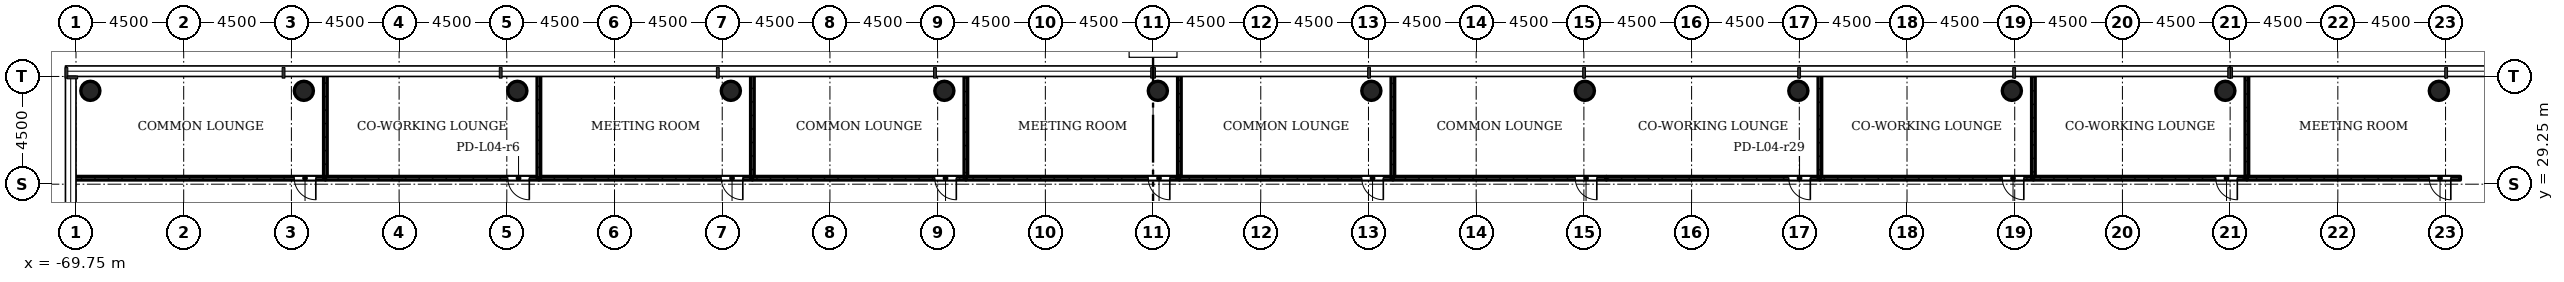
"""IFC4 building model, lengths in metres.
Left out: names, types, materials, properties, quantities, classifications, styles, units other than length and angle.
Written with IfcOpenShell. Run it as: python <this file> out.ifc"""

import sys

from ifc_helpers import new_model, si_unit, direction, frame, frame_2d, origin, origin_2d, place, context, subcontext, project, spatial, rectangle, hollow_circle, extrude, element, fill, save


model = new_model("IFC4")
c1 = context("Model", 3, precision=1e-05, world=origin(), true_north=direction((0.0, 1.0)))
c2 = subcontext(c1, "Body", "Model", "MODEL_VIEW")
j1 = project(units=[si_unit("LENGTHUNIT", "METRE"), si_unit("PLANEANGLEUNIT", "RADIAN")], contexts=[c1])
p1 = place(None, origin())
s1 = spatial("IfcSite", under=j1, at=p1, CompositionType="ELEMENT")
p2 = place(p1, origin())
s2 = spatial("IfcBuilding", under=s1, at=p2, CompositionType="ELEMENT")
p3 = place(p2, frame((0.0, 0.0, 20.0)))
s3 = spatial("IfcBuildingStorey", under=s2, at=p3, CompositionType="ELEMENT", Elevation=20.0)
for number, where, z_axis, x_axis in (
    (1, (-69.15, 33.15, 0.0), (0.0, 0.0, 1.0), (1.0, 0.0, 0.0)),
    (2, (-60.23, 33.15, 0.0), (0.0, 0.0, 1.0), (1.0, 0.0, 0.0)),
    (3, (-51.31, 33.15, 0.0), (0.0, 0.0, 1.0), (1.0, 0.0, 0.0)),
    (4, (-42.39, 33.15, 0.0), (0.0, 0.0, 1.0), (1.0, 0.0, 0.0)),
    (5, (-33.47, 33.15, 0.0), (0.0, 0.0, 1.0), (1.0, 0.0, 0.0)),
    (6, (-24.55, 33.15, 0.0), (0.0, 0.0, 1.0), (1.0, 0.0, 0.0)),
    (7, (-15.63, 33.15, 0.0), (0.0, 0.0, 1.0), (1.0, 0.0, 0.0)),
    (8, (-6.71, 33.15, 0.0), (0.0, 0.0, 1.0), (1.0, 0.0, 0.0)),
    (9, (2.21, 33.15, 0.0), (0.0, 0.0, 1.0), (1.0, 0.0, 0.0)),
    (10, (11.13, 33.15, 0.0), (0.0, 0.0, 1.0), (1.0, 0.0, 0.0)),
    (11, (20.05, 33.15, 0.0), (0.0, 0.0, 1.0), (1.0, 0.0, 0.0)),
    (12, (28.97, 33.15, 0.0), (0.0, 0.0, 1.0), (1.0, 0.0, 0.0)),
):
    element("IfcColumn", number, at=place(p3, frame(where, z_axis=z_axis, x_axis=x_axis)), inside=s3, PredefinedType="COLUMN", context=c2, shape_type="SweptSolid", body=[
        extrude(hollow_circle(Radius=0.4, WallThickness=0.028, at=origin_2d()), origin(), (0.0, 0.0, 1.0), 4.08),
    ])
p4 = place(p3, frame((-59.33, 29.5, 0.0), z_axis=(0.0, 0.0, 1.0), x_axis=(-1.0, 0.0, 0.0)))
e13 = element("IfcWall", 13, at=p4, inside=s3, PredefinedType="PARTITIONING", context=c2, shape_type="SweptSolid", body=[
    extrude(rectangle(XDim=10.52, YDim=0.15, at=frame_2d((5.26, 0.0))), origin(), (0.0, 0.0, 1.0), 4.075),
])
p5 = place(p4, frame((0.4, 0.0, 0.0)))
e14 = element("IfcOpeningElement", 14, at=p5, cuts=e13, PredefinedType="OPENING", context=c2, shape_type="SweptSolid", body=[
    extrude(rectangle(XDim=0.9, YDim=2.1, at=frame_2d((0.45, 1.05))), frame((0.0, 0.085, 0.0), z_axis=(0.0, -1.0, 0.0), x_axis=(1.0, 0.0, 0.0)), (0.0, 0.0, 1.0), 0.17),
])
p6 = place(p3, frame((-59.33, 33.85, 0.0), z_axis=(0.0, 0.0, 1.0), x_axis=(0.0, -1.0, 0.0)))
e15 = element("IfcWall", 15, at=p6, inside=s3, PredefinedType="PARTITIONING", context=c2, shape_type="SweptSolid", body=[
    extrude(rectangle(XDim=4.35, YDim=0.15, at=frame_2d((2.175, 0.0))), origin(), (0.0, 0.0, 1.0), 4.075),
])
p7 = place(p3, frame((-50.41, 29.5, 0.0), z_axis=(0.0, 0.0, 1.0), x_axis=(-1.0, 0.0, 0.0)))
e16 = element("IfcWall", 16, at=p7, inside=s3, PredefinedType="PARTITIONING", context=c2, shape_type="SweptSolid", body=[
    extrude(rectangle(XDim=8.92, YDim=0.15, at=frame_2d((4.46, 0.0))), origin(), (0.0, 0.0, 1.0), 4.075),
])
p8 = place(p7, frame((0.4, 0.0, 0.0)))
e17 = element("IfcOpeningElement", 17, at=p8, cuts=e16, PredefinedType="OPENING", context=c2, shape_type="SweptSolid", body=[
    extrude(rectangle(XDim=0.9, YDim=2.1, at=frame_2d((0.45, 1.05))), frame((0.0, 0.085, 0.0), z_axis=(0.0, -1.0, 0.0), x_axis=(1.0, 0.0, 0.0)), (0.0, 0.0, 1.0), 0.17),
])
p9 = place(p3, frame((-41.49, 29.5, 0.0), z_axis=(0.0, 0.0, 1.0), x_axis=(-1.0, 0.0, 0.0)))
e18 = element("IfcWall", 18, at=p9, inside=s3, PredefinedType="PARTITIONING", context=c2, shape_type="SweptSolid", body=[
    extrude(rectangle(XDim=8.92, YDim=0.15, at=frame_2d((4.46, 0.0))), origin(), (0.0, 0.0, 1.0), 4.075),
])
p10 = place(p9, frame((0.4, 0.0, 0.0)))
e19 = element("IfcOpeningElement", 19, at=p10, cuts=e18, PredefinedType="OPENING", context=c2, shape_type="SweptSolid", body=[
    extrude(rectangle(XDim=0.9, YDim=2.1, at=frame_2d((0.45, 1.05))), frame((0.0, 0.085, 0.0), z_axis=(0.0, -1.0, 0.0), x_axis=(1.0, 0.0, 0.0)), (0.0, 0.0, 1.0), 0.17),
])
for number, where, z_axis, x_axis in (
    (20, (-50.41, 29.5, 0.0), (0.0, 0.0, 1.0), (0.0, 1.0, 0.0)),
    (21, (-41.49, 33.85, 0.0), (0.0, 0.0, 1.0), (0.0, -1.0, 0.0)),
):
    element("IfcWall", number, at=place(p3, frame(where, z_axis=z_axis, x_axis=x_axis)), inside=s3, PredefinedType="PARTITIONING", context=c2, shape_type="SweptSolid", body=[
        extrude(rectangle(XDim=4.35, YDim=0.15, at=frame_2d((2.175, 0.0))), origin(), (0.0, 0.0, 1.0), 4.075),
    ])
p11 = place(p3, frame((-32.57, 29.5, 0.0), z_axis=(0.0, 0.0, 1.0), x_axis=(-1.0, 0.0, 0.0)))
e22 = element("IfcWall", 22, at=p11, inside=s3, PredefinedType="PARTITIONING", context=c2, shape_type="SweptSolid", body=[
    extrude(rectangle(XDim=8.92, YDim=0.15, at=frame_2d((4.46, 0.0))), origin(), (0.0, 0.0, 1.0), 4.075),
])
p12 = place(p11, frame((0.4, 0.0, 0.0)))
e23 = element("IfcOpeningElement", 23, at=p12, cuts=e22, PredefinedType="OPENING", context=c2, shape_type="SweptSolid", body=[
    extrude(rectangle(XDim=0.9, YDim=2.1, at=frame_2d((0.45, 1.05))), frame((0.0, 0.085, 0.0), z_axis=(0.0, -1.0, 0.0), x_axis=(1.0, 0.0, 0.0)), (0.0, 0.0, 1.0), 0.17),
])
p13 = place(p3, frame((-32.57, 33.85, 0.0), z_axis=(0.0, 0.0, 1.0), x_axis=(0.0, -1.0, 0.0)))
e24 = element("IfcWall", 24, at=p13, inside=s3, PredefinedType="PARTITIONING", context=c2, shape_type="SweptSolid", body=[
    extrude(rectangle(XDim=4.35, YDim=0.15, at=frame_2d((2.175, 0.0))), origin(), (0.0, 0.0, 1.0), 4.075),
])
p14 = place(p3, frame((-23.65, 29.5, 0.0), z_axis=(0.0, 0.0, 1.0), x_axis=(-1.0, 0.0, 0.0)))
e25 = element("IfcWall", 25, at=p14, inside=s3, PredefinedType="PARTITIONING", context=c2, shape_type="SweptSolid", body=[
    extrude(rectangle(XDim=8.92, YDim=0.15, at=frame_2d((4.46, 0.0))), origin(), (0.0, 0.0, 1.0), 4.075),
])
p15 = place(p14, frame((0.4, 0.0, 0.0)))
e26 = element("IfcOpeningElement", 26, at=p15, cuts=e25, PredefinedType="OPENING", context=c2, shape_type="SweptSolid", body=[
    extrude(rectangle(XDim=0.9, YDim=2.1, at=frame_2d((0.45, 1.05))), frame((0.0, 0.085, 0.0), z_axis=(0.0, -1.0, 0.0), x_axis=(1.0, 0.0, 0.0)), (0.0, 0.0, 1.0), 0.17),
])
p16 = place(p3, frame((-23.65, 33.85, 0.0), z_axis=(0.0, 0.0, 1.0), x_axis=(0.0, -1.0, 0.0)))
e27 = element("IfcWall", 27, at=p16, inside=s3, PredefinedType="PARTITIONING", context=c2, shape_type="SweptSolid", body=[
    extrude(rectangle(XDim=4.35, YDim=0.15, at=frame_2d((2.175, 0.0))), origin(), (0.0, 0.0, 1.0), 4.075),
])
p17 = place(p3, frame((-14.73, 29.5, 0.0), z_axis=(0.0, 0.0, 1.0), x_axis=(-1.0, 0.0, 0.0)))
e28 = element("IfcWall", 28, at=p17, inside=s3, PredefinedType="PARTITIONING", context=c2, shape_type="SweptSolid", body=[
    extrude(rectangle(XDim=8.92, YDim=0.15, at=frame_2d((4.46, 0.0))), origin(), (0.0, 0.0, 1.0), 4.075),
])
p18 = place(p17, frame((0.4, 0.0, 0.0)))
e29 = element("IfcOpeningElement", 29, at=p18, cuts=e28, PredefinedType="OPENING", context=c2, shape_type="SweptSolid", body=[
    extrude(rectangle(XDim=0.9, YDim=2.1, at=frame_2d((0.45, 1.05))), frame((0.0, 0.085, 0.0), z_axis=(0.0, -1.0, 0.0), x_axis=(1.0, 0.0, 0.0)), (0.0, 0.0, 1.0), 0.17),
])
p19 = place(p3, frame((-14.73, 33.85, 0.0), z_axis=(0.0, 0.0, 1.0), x_axis=(0.0, -1.0, 0.0)))
e30 = element("IfcWall", 30, at=p19, inside=s3, PredefinedType="PARTITIONING", context=c2, shape_type="SweptSolid", body=[
    extrude(rectangle(XDim=4.35, YDim=0.15, at=frame_2d((2.175, 0.0))), origin(), (0.0, 0.0, 1.0), 4.075),
])
p20 = place(p3, frame((-5.81, 29.5, 0.0), z_axis=(0.0, 0.0, 1.0), x_axis=(-1.0, 0.0, 0.0)))
e31 = element("IfcWall", 31, at=p20, inside=s3, PredefinedType="PARTITIONING", context=c2, shape_type="SweptSolid", body=[
    extrude(rectangle(XDim=8.92, YDim=0.15, at=frame_2d((4.46, 0.0))), origin(), (0.0, 0.0, 1.0), 4.075),
])
p21 = place(p20, frame((0.4, 0.0, 0.0)))
e32 = element("IfcOpeningElement", 32, at=p21, cuts=e31, PredefinedType="OPENING", context=c2, shape_type="SweptSolid", body=[
    extrude(rectangle(XDim=0.9, YDim=2.1, at=frame_2d((0.45, 1.05))), frame((0.0, 0.085, 0.0), z_axis=(0.0, -1.0, 0.0), x_axis=(1.0, 0.0, 0.0)), (0.0, 0.0, 1.0), 0.17),
])
p22 = place(p3, frame((3.11, 29.5, 0.0), z_axis=(0.0, 0.0, 1.0), x_axis=(-1.0, 0.0, 0.0)))
e33 = element("IfcWall", 33, at=p22, inside=s3, PredefinedType="PARTITIONING", context=c2, shape_type="SweptSolid", body=[
    extrude(rectangle(XDim=8.92, YDim=0.15, at=frame_2d((4.46, 0.0))), origin(), (0.0, 0.0, 1.0), 4.075),
])
p23 = place(p22, frame((0.4, 0.0, 0.0)))
e34 = element("IfcOpeningElement", 34, at=p23, cuts=e33, PredefinedType="OPENING", context=c2, shape_type="SweptSolid", body=[
    extrude(rectangle(XDim=0.9, YDim=2.1, at=frame_2d((0.45, 1.05))), frame((0.0, 0.085, 0.0), z_axis=(0.0, -1.0, 0.0), x_axis=(1.0, 0.0, 0.0)), (0.0, 0.0, 1.0), 0.17),
])
p24 = place(p3, frame((3.11, 33.85, 0.0), z_axis=(0.0, 0.0, 1.0), x_axis=(0.0, -1.0, 0.0)))
e35 = element("IfcWall", 35, at=p24, inside=s3, PredefinedType="PARTITIONING", context=c2, shape_type="SweptSolid", body=[
    extrude(rectangle(XDim=4.35, YDim=0.15, at=frame_2d((2.175, 0.0))), origin(), (0.0, 0.0, 1.0), 4.075),
])
p25 = place(p3, frame((12.03, 29.5, 0.0), z_axis=(0.0, 0.0, 1.0), x_axis=(-1.0, 0.0, 0.0)))
e36 = element("IfcWall", 36, at=p25, inside=s3, PredefinedType="PARTITIONING", context=c2, shape_type="SweptSolid", body=[
    extrude(rectangle(XDim=8.92, YDim=0.15, at=frame_2d((4.46, 0.0))), origin(), (0.0, 0.0, 1.0), 4.075),
])
p26 = place(p25, frame((0.4, 0.0, 0.0)))
e37 = element("IfcOpeningElement", 37, at=p26, cuts=e36, PredefinedType="OPENING", context=c2, shape_type="SweptSolid", body=[
    extrude(rectangle(XDim=0.9, YDim=2.1, at=frame_2d((0.45, 1.05))), frame((0.0, 0.085, 0.0), z_axis=(0.0, -1.0, 0.0), x_axis=(1.0, 0.0, 0.0)), (0.0, 0.0, 1.0), 0.17),
])
p27 = place(p3, frame((12.03, 33.85, 0.0), z_axis=(0.0, 0.0, 1.0), x_axis=(0.0, -1.0, 0.0)))
e38 = element("IfcWall", 38, at=p27, inside=s3, PredefinedType="PARTITIONING", context=c2, shape_type="SweptSolid", body=[
    extrude(rectangle(XDim=4.35, YDim=0.15, at=frame_2d((2.175, 0.0))), origin(), (0.0, 0.0, 1.0), 4.075),
])
p28 = place(p3, frame((20.95, 29.5, 0.0), z_axis=(0.0, 0.0, 1.0), x_axis=(-1.0, 0.0, 0.0)))
e39 = element("IfcWall", 39, at=p28, inside=s3, PredefinedType="PARTITIONING", context=c2, shape_type="SweptSolid", body=[
    extrude(rectangle(XDim=8.92, YDim=0.15, at=frame_2d((4.46, 0.0))), origin(), (0.0, 0.0, 1.0), 4.075),
])
p29 = place(p28, frame((0.4, 0.0, 0.0)))
e40 = element("IfcOpeningElement", 40, at=p29, cuts=e39, PredefinedType="OPENING", context=c2, shape_type="SweptSolid", body=[
    extrude(rectangle(XDim=0.9, YDim=2.1, at=frame_2d((0.45, 1.05))), frame((0.0, 0.085, 0.0), z_axis=(0.0, -1.0, 0.0), x_axis=(1.0, 0.0, 0.0)), (0.0, 0.0, 1.0), 0.17),
])
p30 = place(p3, frame((20.95, 33.85, 0.0), z_axis=(0.0, 0.0, 1.0), x_axis=(0.0, -1.0, 0.0)))
e41 = element("IfcWall", 41, at=p30, inside=s3, PredefinedType="PARTITIONING", context=c2, shape_type="SweptSolid", body=[
    extrude(rectangle(XDim=4.35, YDim=0.15, at=frame_2d((2.175, 0.0))), origin(), (0.0, 0.0, 1.0), 4.075),
])
p31 = place(p3, frame((29.87, 29.5, 0.0), z_axis=(0.0, 0.0, 1.0), x_axis=(-1.0, 0.0, 0.0)))
e42 = element("IfcWall", 42, at=p31, inside=s3, PredefinedType="PARTITIONING", context=c2, shape_type="SweptSolid", body=[
    extrude(rectangle(XDim=8.92, YDim=0.15, at=frame_2d((4.46, 0.0))), origin(), (0.0, 0.0, 1.0), 4.075),
])
p32 = place(p31, frame((0.4, 0.0, 0.0)))
e43 = element("IfcOpeningElement", 43, at=p32, cuts=e42, PredefinedType="OPENING", context=c2, shape_type="SweptSolid", body=[
    extrude(rectangle(XDim=0.9, YDim=2.1, at=frame_2d((0.45, 1.05))), frame((0.0, 0.085, 0.0), z_axis=(0.0, -1.0, 0.0), x_axis=(1.0, 0.0, 0.0)), (0.0, 0.0, 1.0), 0.17),
])
p33 = place(p5, origin())
e44 = element("IfcDoor", 44, at=p33, inside=s3, OperationType="SINGLE_SWING_RIGHT", PredefinedType="DOOR", context=c2, shape_type="SweptSolid", body=[
    extrude(rectangle(XDim=0.9, YDim=2.1, at=frame_2d((0.45, 1.05))), frame((0.0, 0.025, 0.0), z_axis=(0.0, -1.0, 0.0), x_axis=(1.0, 0.0, 0.0)), (0.0, 0.0, 1.0), 0.05),
])
fill(e14, e44)
p34 = place(p8, origin())
e45 = element("IfcDoor", 45, at=p34, inside=s3, OperationType="SINGLE_SWING_RIGHT", PredefinedType="DOOR", context=c2, shape_type="SweptSolid", body=[
    extrude(rectangle(XDim=0.9, YDim=2.1, at=frame_2d((0.45, 1.05))), frame((0.0, 0.025, 0.0), z_axis=(0.0, -1.0, 0.0), x_axis=(1.0, 0.0, 0.0)), (0.0, 0.0, 1.0), 0.05),
])
fill(e17, e45)
p35 = place(p10, origin())
e46 = element("IfcDoor", 46, at=p35, inside=s3, OperationType="SINGLE_SWING_RIGHT", PredefinedType="DOOR", context=c2, shape_type="SweptSolid", body=[
    extrude(rectangle(XDim=0.9, YDim=2.1, at=frame_2d((0.45, 1.05))), frame((0.0, 0.025, 0.0), z_axis=(0.0, -1.0, 0.0), x_axis=(1.0, 0.0, 0.0)), (0.0, 0.0, 1.0), 0.05),
])
fill(e19, e46)
p36 = place(p12, origin())
e47 = element("IfcDoor", 47, at=p36, inside=s3, OperationType="SINGLE_SWING_RIGHT", PredefinedType="DOOR", context=c2, shape_type="SweptSolid", body=[
    extrude(rectangle(XDim=0.9, YDim=2.1, at=frame_2d((0.45, 1.05))), frame((0.0, 0.025, 0.0), z_axis=(0.0, -1.0, 0.0), x_axis=(1.0, 0.0, 0.0)), (0.0, 0.0, 1.0), 0.05),
])
fill(e23, e47)
p37 = place(p15, origin())
e48 = element("IfcDoor", 48, at=p37, inside=s3, OperationType="SINGLE_SWING_RIGHT", PredefinedType="DOOR", context=c2, shape_type="SweptSolid", body=[
    extrude(rectangle(XDim=0.9, YDim=2.1, at=frame_2d((0.45, 1.05))), frame((0.0, 0.025, 0.0), z_axis=(0.0, -1.0, 0.0), x_axis=(1.0, 0.0, 0.0)), (0.0, 0.0, 1.0), 0.05),
])
fill(e26, e48)
p38 = place(p18, origin())
e49 = element("IfcDoor", 49, at=p38, inside=s3, OperationType="SINGLE_SWING_RIGHT", PredefinedType="DOOR", context=c2, shape_type="SweptSolid", body=[
    extrude(rectangle(XDim=0.9, YDim=2.1, at=frame_2d((0.45, 1.05))), frame((0.0, 0.025, 0.0), z_axis=(0.0, -1.0, 0.0), x_axis=(1.0, 0.0, 0.0)), (0.0, 0.0, 1.0), 0.05),
])
fill(e29, e49)
p39 = place(p21, origin())
e50 = element("IfcDoor", 50, at=p39, inside=s3, OperationType="SINGLE_SWING_RIGHT", PredefinedType="DOOR", context=c2, shape_type="SweptSolid", body=[
    extrude(rectangle(XDim=0.9, YDim=2.1, at=frame_2d((0.45, 1.05))), frame((0.0, 0.025, 0.0), z_axis=(0.0, -1.0, 0.0), x_axis=(1.0, 0.0, 0.0)), (0.0, 0.0, 1.0), 0.05),
])
fill(e32, e50)
p40 = place(p23, origin())
e51 = element("IfcDoor", 51, at=p40, inside=s3, OperationType="SINGLE_SWING_RIGHT", PredefinedType="DOOR", context=c2, shape_type="SweptSolid", body=[
    extrude(rectangle(XDim=0.9, YDim=2.1, at=frame_2d((0.45, 1.05))), frame((0.0, 0.025, 0.0), z_axis=(0.0, -1.0, 0.0), x_axis=(1.0, 0.0, 0.0)), (0.0, 0.0, 1.0), 0.05),
])
fill(e34, e51)
p41 = place(p26, origin())
e52 = element("IfcDoor", 52, at=p41, inside=s3, OperationType="SINGLE_SWING_RIGHT", PredefinedType="DOOR", context=c2, shape_type="SweptSolid", body=[
    extrude(rectangle(XDim=0.9, YDim=2.1, at=frame_2d((0.45, 1.05))), frame((0.0, 0.025, 0.0), z_axis=(0.0, -1.0, 0.0), x_axis=(1.0, 0.0, 0.0)), (0.0, 0.0, 1.0), 0.05),
])
fill(e37, e52)
p42 = place(p29, origin())
e53 = element("IfcDoor", 53, at=p42, inside=s3, OperationType="SINGLE_SWING_RIGHT", PredefinedType="DOOR", context=c2, shape_type="SweptSolid", body=[
    extrude(rectangle(XDim=0.9, YDim=2.1, at=frame_2d((0.45, 1.05))), frame((0.0, 0.025, 0.0), z_axis=(0.0, -1.0, 0.0), x_axis=(1.0, 0.0, 0.0)), (0.0, 0.0, 1.0), 0.05),
])
fill(e40, e53)
p43 = place(p32, origin())
e54 = element("IfcDoor", 54, at=p43, inside=s3, OperationType="SINGLE_SWING_RIGHT", PredefinedType="DOOR", context=c2, shape_type="SweptSolid", body=[
    extrude(rectangle(XDim=0.9, YDim=2.1, at=frame_2d((0.45, 1.05))), frame((0.0, 0.025, 0.0), z_axis=(0.0, -1.0, 0.0), x_axis=(1.0, 0.0, 0.0)), (0.0, 0.0, 1.0), 0.05),
])
fill(e43, e54)
save(model, sys.argv[1])
